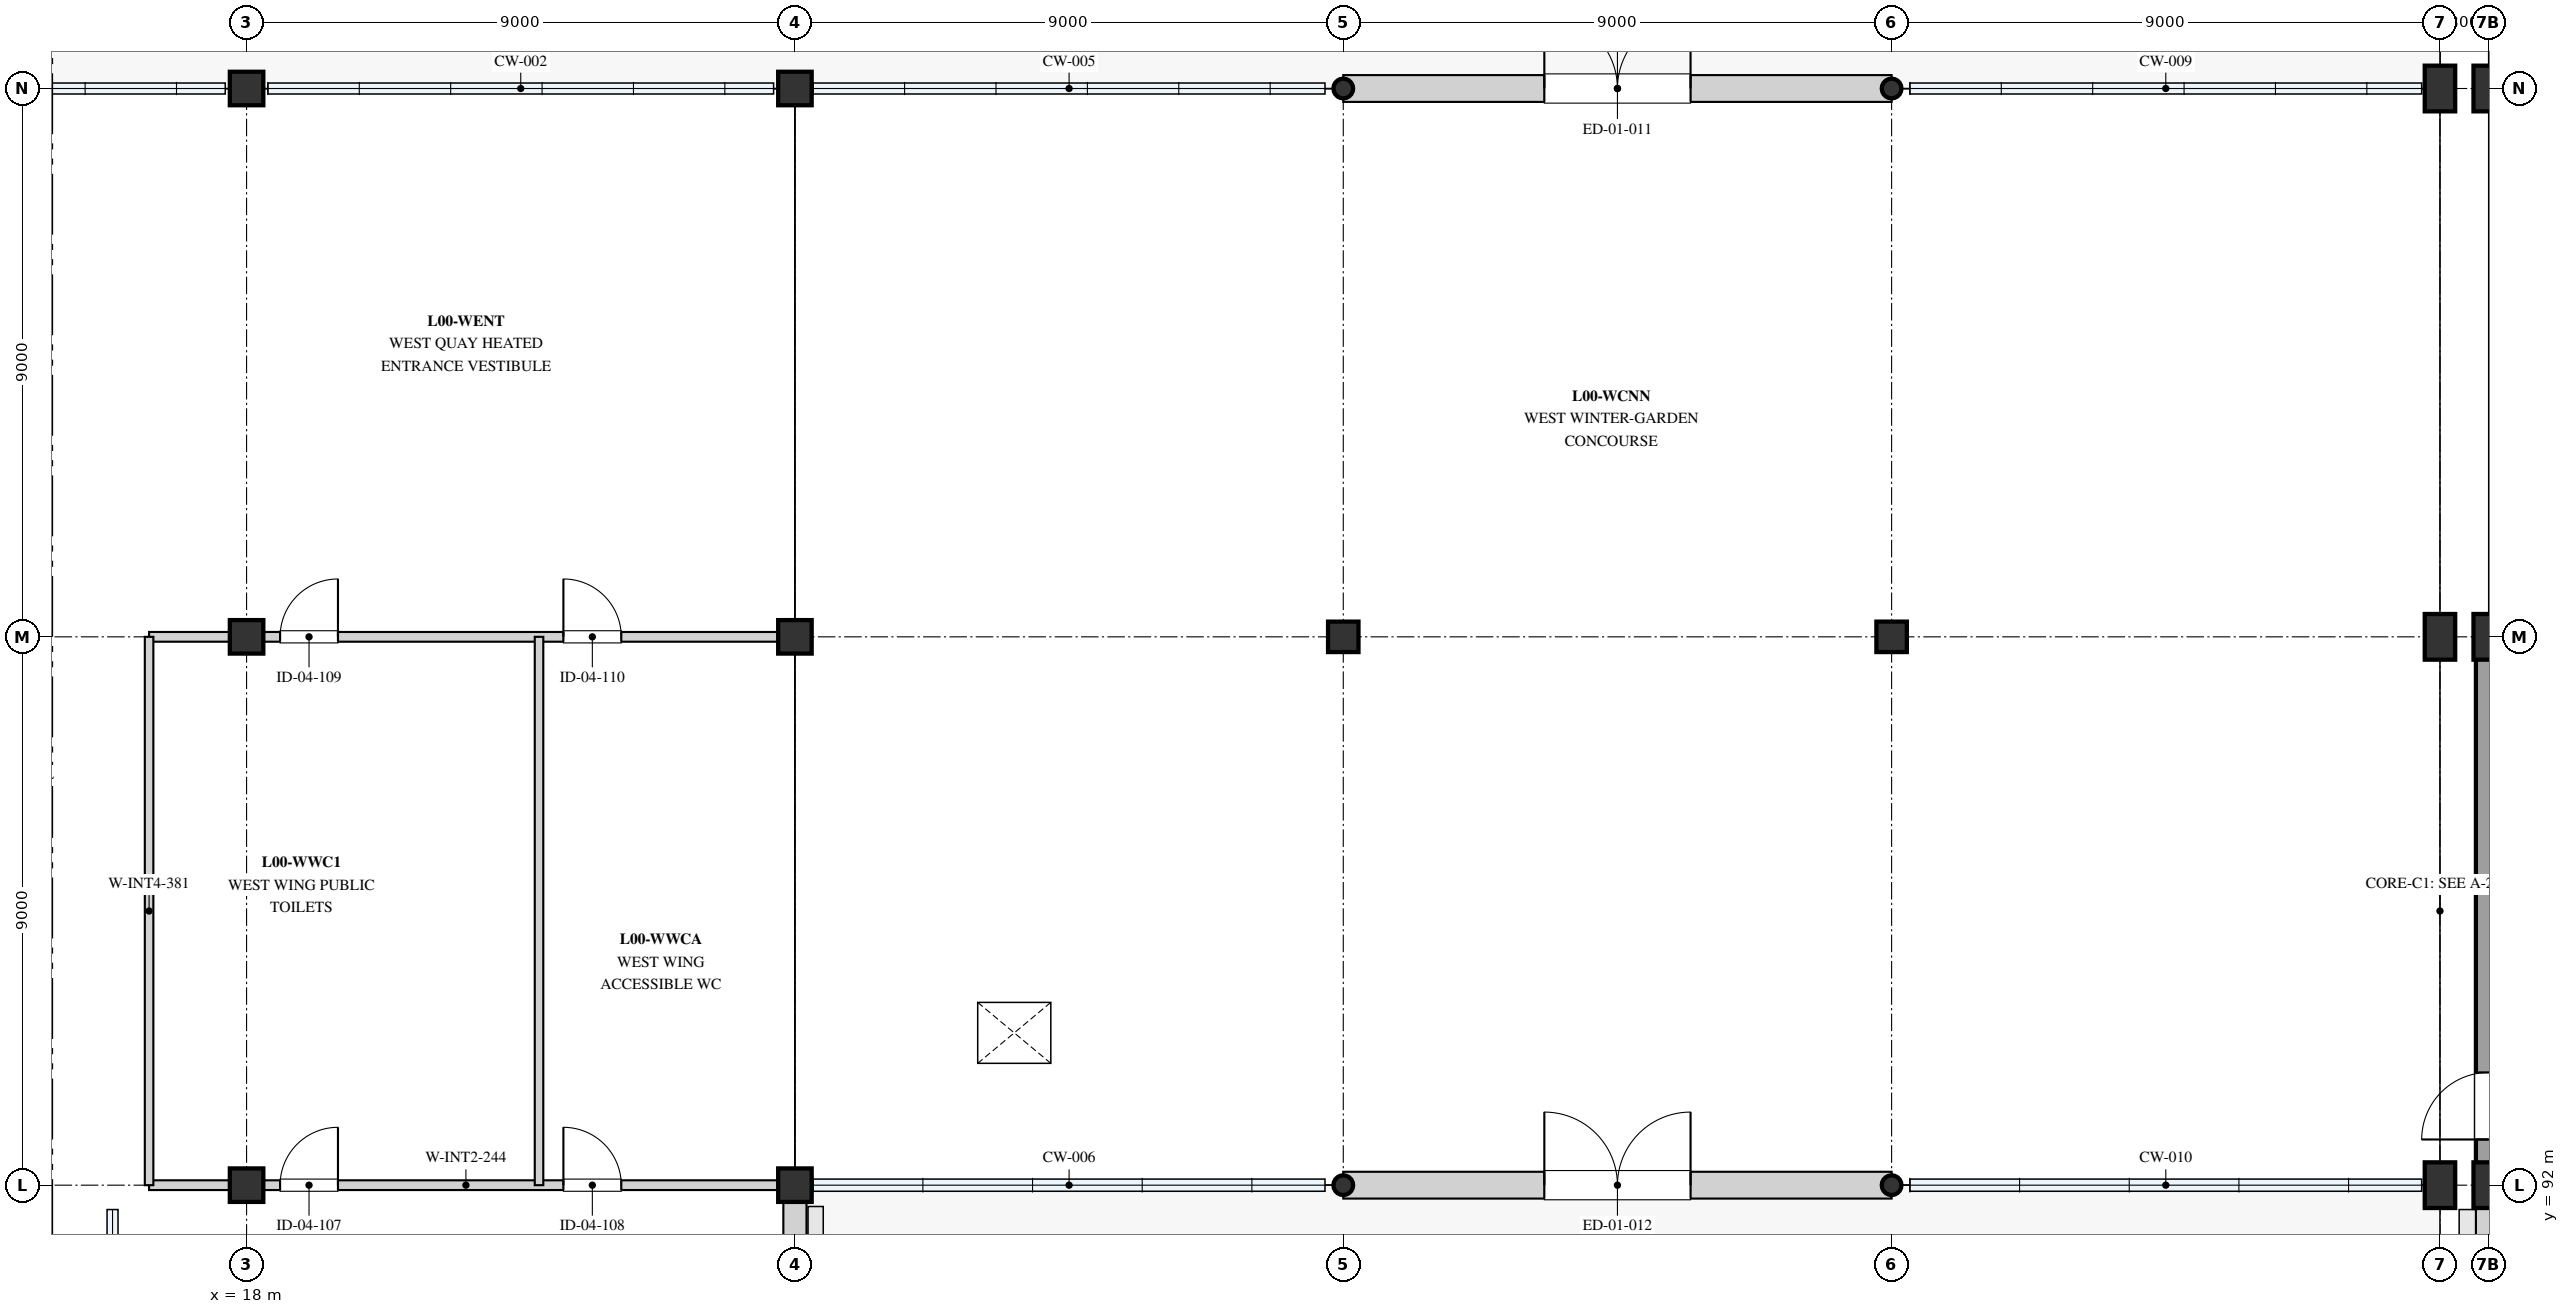
"""IFC4 building model, lengths in metres.
Left out: names, types, materials, properties, quantities, classifications, styles, units other than length and angle.
Written with IfcOpenShell. Run it as: python <this file> out.ifc"""

import sys

from ifc_helpers import new_model, si_unit, direction, frame, frame_2d, origin, origin_2d, place, context, subcontext, project, spatial, rectangle, hollow_circle, extrude, element, fill, save


model = new_model("IFC4")
c1 = context("Model", 3, precision=1e-05, world=origin(), true_north=direction((0.0, 1.0)))
c2 = subcontext(c1, "Body", "Model", "MODEL_VIEW")
j1 = project(units=[si_unit("LENGTHUNIT", "METRE"), si_unit("PLANEANGLEUNIT", "RADIAN")], contexts=[c1])
p1 = place(None, origin())
s1 = spatial("IfcSite", under=j1, at=p1, CompositionType="ELEMENT")
p2 = place(p1, origin())
s2 = spatial("IfcBuilding", under=s1, at=p2, CompositionType="ELEMENT")
p3 = place(p2, origin())
s3 = spatial("IfcBuildingStorey", under=s2, at=p3, CompositionType="ELEMENT", Elevation=0.0)
for number, where, z_axis, x_axis in (
    (1, (18.0, 92.0, 0.0), (0.0, 0.0, 1.0), (1.0, 0.0, 0.0)),
    (2, (18.0, 101.0, 0.0), (0.0, 0.0, 1.0), (1.0, 0.0, 0.0)),
    (3, (18.0, 110.0, 0.0), (0.0, 0.0, 1.0), (1.0, 0.0, 0.0)),
    (4, (27.0, 92.0, 0.0), (0.0, 0.0, 1.0), (1.0, 0.0, 0.0)),
    (5, (27.0, 101.0, 0.0), (0.0, 0.0, 1.0), (1.0, 0.0, 0.0)),
    (6, (27.0, 110.0, 0.0), (0.0, 0.0, 1.0), (1.0, 0.0, 0.0)),
):
    element("IfcColumn", number, at=place(p3, frame(where, z_axis=z_axis, x_axis=x_axis)), inside=s3, PredefinedType="COLUMN", context=c2, shape_type="SweptSolid", body=[
        extrude(rectangle(XDim=0.55, YDim=0.55, at=origin_2d()), origin(), (0.0, 0.0, 1.0), 4.5),
    ])
p4 = place(p3, frame((36.0, 92.0, 0.0), z_axis=(0.0, 0.0, 1.0), x_axis=(1.0, 0.0, 0.0)))
e7 = element("IfcColumn", 7, at=p4, inside=s3, PredefinedType="PILASTER", context=c2, shape_type="SweptSolid", body=[
    extrude(hollow_circle(Radius=0.162, WallThickness=0.012, at=origin_2d()), origin(), (0.0, 0.0, 1.0), 4.5),
])
p5 = place(p3, frame((36.0, 101.0, 0.0), z_axis=(0.0, 0.0, 1.0), x_axis=(1.0, 0.0, 0.0)))
e8 = element("IfcColumn", 8, at=p5, inside=s3, PredefinedType="COLUMN", context=c2, shape_type="SweptSolid", body=[
    extrude(rectangle(XDim=0.5, YDim=0.5, at=origin_2d()), origin(), (0.0, 0.0, 1.0), 4.5),
])
for number, where, z_axis, x_axis in (
    (9, (36.0, 110.0, 0.0), (0.0, 0.0, 1.0), (1.0, 0.0, 0.0)),
    (10, (45.0, 92.0, 0.0), (0.0, 0.0, 1.0), (1.0, 0.0, 0.0)),
):
    element("IfcColumn", number, at=place(p3, frame(where, z_axis=z_axis, x_axis=x_axis)), inside=s3, PredefinedType="PILASTER", context=c2, shape_type="SweptSolid", body=[
        extrude(hollow_circle(Radius=0.162, WallThickness=0.012, at=origin_2d()), origin(), (0.0, 0.0, 1.0), 4.5),
    ])
p6 = place(p3, frame((45.0, 101.0, 0.0), z_axis=(0.0, 0.0, 1.0), x_axis=(1.0, 0.0, 0.0)))
e11 = element("IfcColumn", 11, at=p6, inside=s3, PredefinedType="COLUMN", context=c2, shape_type="SweptSolid", body=[
    extrude(rectangle(XDim=0.5, YDim=0.5, at=origin_2d()), origin(), (0.0, 0.0, 1.0), 4.5),
])
p7 = place(p3, frame((45.0, 110.0, 0.0), z_axis=(0.0, 0.0, 1.0), x_axis=(1.0, 0.0, 0.0)))
e12 = element("IfcColumn", 12, at=p7, inside=s3, PredefinedType="PILASTER", context=c2, shape_type="SweptSolid", body=[
    extrude(hollow_circle(Radius=0.162, WallThickness=0.012, at=origin_2d()), origin(), (0.0, 0.0, 1.0), 4.5),
])
for number, where, z_axis, x_axis in (
    (13, (54.0, 92.0, 0.0), (0.0, 0.0, 1.0), (1.0, 0.0, 0.0)),
    (14, (54.0, 101.0, 0.0), (0.0, 0.0, 1.0), (1.0, 0.0, 0.0)),
    (15, (54.0, 110.0, 0.0), (0.0, 0.0, 1.0), (1.0, 0.0, 0.0)),
    (16, (54.8, 92.0, 0.0), (0.0, 0.0, 1.0), (1.0, 0.0, 0.0)),
    (17, (54.8, 101.0, 0.0), (0.0, 0.0, 1.0), (1.0, 0.0, 0.0)),
    (18, (54.8, 110.0, 0.0), (0.0, 0.0, 1.0), (1.0, 0.0, 0.0)),
):
    element("IfcColumn", number, at=place(p3, frame(where, z_axis=z_axis, x_axis=x_axis)), inside=s3, PredefinedType="COLUMN", context=c2, shape_type="SweptSolid", body=[
        extrude(rectangle(XDim=0.5, YDim=0.75, at=origin_2d()), origin(), (0.0, 0.0, 1.0), 4.5),
    ])
p8 = place(p3, frame((27.0, 83.0, 0.0), z_axis=(0.0, 0.0, 1.0), x_axis=(0.0, 1.0, 0.0)))
e19 = element("IfcWall", 19, at=p8, inside=s3, PredefinedType="STANDARD", context=c2, shape_type="SweptSolid", body=[
    extrude(rectangle(XDim=9.0, YDim=0.38, at=frame_2d((4.5, 0.0))), origin(), (0.0, 0.0, 1.0), 3.35),
])
p9 = place(p8, frame((2.1, 0.0, 0.95)))
e20 = element("IfcOpeningElement", 20, at=p9, cuts=e19, PredefinedType="OPENING", context=c2, shape_type="SweptSolid", body=[
    extrude(rectangle(XDim=1.6, YDim=2.1, at=frame_2d((0.8, 1.05))), frame((0.0, 0.2, 0.0), z_axis=(0.0, -1.0, 0.0), x_axis=(1.0, 0.0, 0.0)), (0.0, 0.0, 1.0), 0.4),
])
p10 = place(p8, frame((5.3, 0.0, 0.95)))
e21 = element("IfcOpeningElement", 21, at=p10, cuts=e19, PredefinedType="OPENING", context=c2, shape_type="SweptSolid", body=[
    extrude(rectangle(XDim=1.6, YDim=2.1, at=frame_2d((0.8, 1.05))), frame((0.0, 0.2, 0.0), z_axis=(0.0, -1.0, 0.0), x_axis=(1.0, 0.0, 0.0)), (0.0, 0.0, 1.0), 0.4),
])
p11 = place(p3, frame((36.0, 110.0, 0.0), z_axis=(0.0, 0.0, 1.0), x_axis=(1.0, 0.0, 0.0)))
e22 = element("IfcWall", 22, at=p11, inside=s3, PredefinedType="STANDARD", context=c2, shape_type="SweptSolid", body=[
    extrude(rectangle(XDim=9.0, YDim=0.44, at=frame_2d((4.5, 0.0))), origin(), (0.0, 0.0, 1.0), 3.52),
])
p12 = place(p11, frame((3.3, 0.0, 0.0)))
e23 = element("IfcOpeningElement", 23, at=p12, cuts=e22, PredefinedType="OPENING", context=c2, shape_type="SweptSolid", body=[
    extrude(rectangle(XDim=2.4, YDim=2.6, at=frame_2d((1.2, 1.3))), frame((0.0, 0.23, 0.0), z_axis=(0.0, -1.0, 0.0), x_axis=(1.0, 0.0, 0.0)), (0.0, 0.0, 1.0), 0.46),
])
p13 = place(p3, frame((36.0, 92.0, 0.0), z_axis=(0.0, 0.0, 1.0), x_axis=(1.0, 0.0, 0.0)))
e24 = element("IfcWall", 24, at=p13, inside=s3, PredefinedType="STANDARD", context=c2, shape_type="SweptSolid", body=[
    extrude(rectangle(XDim=9.0, YDim=0.44, at=frame_2d((4.5, 0.0))), origin(), (0.0, 0.0, 1.0), 3.6),
])
p14 = place(p13, frame((3.3, 0.0, 0.0)))
e25 = element("IfcOpeningElement", 25, at=p14, cuts=e24, PredefinedType="OPENING", context=c2, shape_type="SweptSolid", body=[
    extrude(rectangle(XDim=2.4, YDim=2.6, at=frame_2d((1.2, 1.3))), frame((0.0, 0.23, 0.0), z_axis=(0.0, -1.0, 0.0), x_axis=(1.0, 0.0, 0.0)), (0.0, 0.0, 1.0), 0.46),
])
p15 = place(p3, frame((54.8, 92.0, 0.0), z_axis=(0.0, 0.0, 1.0), x_axis=(0.0, 1.0, 0.0)))
e26 = element("IfcWall", 26, at=p15, inside=s3, PredefinedType="STANDARD", context=c2, shape_type="SweptSolid", body=[
    extrude(rectangle(XDim=9.0, YDim=0.42, at=frame_2d((4.5, 0.0))), origin(), (0.0, 0.0, 1.0), 4.24),
])
p16 = place(p15, frame((0.75, 0.0, 0.0)))
e27 = element("IfcOpeningElement", 27, at=p16, cuts=e26, PredefinedType="OPENING", context=c2, shape_type="SweptSolid", body=[
    extrude(rectangle(XDim=1.1, YDim=2.2, at=frame_2d((0.55, 1.1))), frame((0.0, 0.22, 0.0), z_axis=(0.0, -1.0, 0.0), x_axis=(1.0, 0.0, 0.0)), (0.0, 0.0, 1.0), 0.44),
])
p17 = place(p3, frame((54.8, 83.0, 0.0), z_axis=(0.0, 0.0, 1.0), x_axis=(0.0, 1.0, 0.0)))
e28 = element("IfcWall", 28, at=p17, inside=s3, PredefinedType="STANDARD", context=c2, shape_type="SweptSolid", body=[
    extrude(rectangle(XDim=9.0, YDim=0.42, at=frame_2d((4.5, 0.0))), origin(), (0.0, 0.0, 1.0), 3.37),
])
p18 = place(p17, frame((1.8, 0.0, 0.59)))
e29 = element("IfcOpeningElement", 29, at=p18, cuts=e28, PredefinedType="OPENING", context=c2, shape_type="SweptSolid", body=[
    extrude(rectangle(XDim=2.4, YDim=2.6, at=frame_2d((1.2, 1.3))), frame((0.0, 0.22, 0.0), z_axis=(0.0, -1.0, 0.0), x_axis=(1.0, 0.0, 0.0)), (0.0, 0.0, 1.0), 0.44),
])
p19 = place(p17, frame((4.8, 0.0, 0.59)))
e30 = element("IfcOpeningElement", 30, at=p19, cuts=e28, PredefinedType="OPENING", context=c2, shape_type="SweptSolid", body=[
    extrude(rectangle(XDim=2.4, YDim=2.6, at=frame_2d((1.2, 1.3))), frame((0.0, 0.22, 0.0), z_axis=(0.0, -1.0, 0.0), x_axis=(1.0, 0.0, 0.0)), (0.0, 0.0, 1.0), 0.44),
])
p20 = place(p3, frame((16.4, 92.0, 0.0), z_axis=(0.0, 0.0, 1.0), x_axis=(1.0, 0.0, 0.0)))
e31 = element("IfcWall", 31, at=p20, inside=s3, PredefinedType="PARTITIONING", context=c2, shape_type="SweptSolid", body=[
    extrude(rectangle(XDim=10.4, YDim=0.16, at=frame_2d((5.2, 0.0))), origin(), (0.0, 0.0, 1.0), 3.2),
])
p21 = place(p20, frame((2.15, 0.0, 0.0)))
e32 = element("IfcOpeningElement", 32, at=p21, cuts=e31, PredefinedType="OPENING", context=c2, shape_type="SweptSolid", body=[
    extrude(rectangle(XDim=0.95, YDim=2.1, at=frame_2d((0.475, 1.05))), frame((0.0, 0.09, 0.0), z_axis=(0.0, -1.0, 0.0), x_axis=(1.0, 0.0, 0.0)), (0.0, 0.0, 1.0), 0.18),
])
p22 = place(p20, frame((6.8, 0.0, 0.0)))
e33 = element("IfcOpeningElement", 33, at=p22, cuts=e31, PredefinedType="OPENING", context=c2, shape_type="SweptSolid", body=[
    extrude(rectangle(XDim=0.95, YDim=2.1, at=frame_2d((0.475, 1.05))), frame((0.0, 0.09, 0.0), z_axis=(0.0, -1.0, 0.0), x_axis=(1.0, 0.0, 0.0)), (0.0, 0.0, 1.0), 0.18),
])
p23 = place(p3, frame((16.4, 101.0, 0.0), z_axis=(0.0, 0.0, 1.0), x_axis=(1.0, 0.0, 0.0)))
e34 = element("IfcWall", 34, at=p23, inside=s3, PredefinedType="PARTITIONING", context=c2, shape_type="SweptSolid", body=[
    extrude(rectangle(XDim=10.4, YDim=0.16, at=frame_2d((5.2, 0.0))), origin(), (0.0, 0.0, 1.0), 3.2),
])
p24 = place(p23, frame((2.15, 0.0, 0.0)))
e35 = element("IfcOpeningElement", 35, at=p24, cuts=e34, PredefinedType="OPENING", context=c2, shape_type="SweptSolid", body=[
    extrude(rectangle(XDim=0.95, YDim=2.1, at=frame_2d((0.475, 1.05))), frame((0.0, 0.09, 0.0), z_axis=(0.0, -1.0, 0.0), x_axis=(1.0, 0.0, 0.0)), (0.0, 0.0, 1.0), 0.18),
])
p25 = place(p23, frame((6.8, 0.0, 0.0)))
e36 = element("IfcOpeningElement", 36, at=p25, cuts=e34, PredefinedType="OPENING", context=c2, shape_type="SweptSolid", body=[
    extrude(rectangle(XDim=0.95, YDim=2.1, at=frame_2d((0.475, 1.05))), frame((0.0, 0.09, 0.0), z_axis=(0.0, -1.0, 0.0), x_axis=(1.0, 0.0, 0.0)), (0.0, 0.0, 1.0), 0.18),
])
for number, where, z_axis, x_axis in (
    (37, (16.4, 92.0, 0.0), (0.0, 0.0, 1.0), (0.0, 1.0, 0.0)),
    (38, (22.8, 92.0, 0.0), (0.0, 0.0, 1.0), (0.0, 1.0, 0.0)),
):
    element("IfcWall", number, at=place(p3, frame(where, z_axis=z_axis, x_axis=x_axis)), inside=s3, PredefinedType="PARTITIONING", context=c2, shape_type="SweptSolid", body=[
        extrude(rectangle(XDim=9.0, YDim=0.14, at=frame_2d((4.5, 0.0))), origin(), (0.0, 0.0, 1.0), 3.2),
    ])
p26 = place(p12, origin())
e39 = element("IfcDoor", 39, at=p26, inside=s3, OperationType="DOUBLE_DOOR_SINGLE_SWING", PredefinedType="DOOR", context=c2, shape_type="SweptSolid", body=[
    extrude(rectangle(XDim=2.4, YDim=2.6, at=frame_2d((1.2, 1.3))), frame((0.0, 0.025, 0.0), z_axis=(0.0, -1.0, 0.0), x_axis=(1.0, 0.0, 0.0)), (0.0, 0.0, 1.0), 0.05),
])
fill(e23, e39)
p27 = place(p14, origin())
e40 = element("IfcDoor", 40, at=p27, inside=s3, OperationType="DOUBLE_DOOR_SINGLE_SWING", PredefinedType="DOOR", context=c2, shape_type="SweptSolid", body=[
    extrude(rectangle(XDim=2.4, YDim=2.6, at=frame_2d((1.2, 1.3))), frame((0.0, 0.025, 0.0), z_axis=(0.0, -1.0, 0.0), x_axis=(1.0, 0.0, 0.0)), (0.0, 0.0, 1.0), 0.05),
])
fill(e25, e40)
p28 = place(p16, origin())
e41 = element("IfcDoor", 41, at=p28, inside=s3, OperationType="SINGLE_SWING_LEFT", PredefinedType="DOOR", context=c2, shape_type="SweptSolid", body=[
    extrude(rectangle(XDim=1.1, YDim=2.2, at=frame_2d((0.55, 1.1))), frame((0.0, 0.025, 0.0), z_axis=(0.0, -1.0, 0.0), x_axis=(1.0, 0.0, 0.0)), (0.0, 0.0, 1.0), 0.05),
])
fill(e27, e41)
p29 = place(p21, origin())
e42 = element("IfcDoor", 42, at=p29, inside=s3, OperationType="SINGLE_SWING_RIGHT", PredefinedType="DOOR", context=c2, shape_type="SweptSolid", body=[
    extrude(rectangle(XDim=0.95, YDim=2.1, at=frame_2d((0.475, 1.05))), frame((0.0, 0.025, 0.0), z_axis=(0.0, -1.0, 0.0), x_axis=(1.0, 0.0, 0.0)), (0.0, 0.0, 1.0), 0.05),
])
fill(e32, e42)
p30 = place(p22, origin())
e43 = element("IfcDoor", 43, at=p30, inside=s3, OperationType="SINGLE_SWING_LEFT", PredefinedType="DOOR", context=c2, shape_type="SweptSolid", body=[
    extrude(rectangle(XDim=0.95, YDim=2.1, at=frame_2d((0.475, 1.05))), frame((0.0, 0.025, 0.0), z_axis=(0.0, -1.0, 0.0), x_axis=(1.0, 0.0, 0.0)), (0.0, 0.0, 1.0), 0.05),
])
fill(e33, e43)
p31 = place(p24, origin())
e44 = element("IfcDoor", 44, at=p31, inside=s3, OperationType="SINGLE_SWING_RIGHT", PredefinedType="DOOR", context=c2, shape_type="SweptSolid", body=[
    extrude(rectangle(XDim=0.95, YDim=2.1, at=frame_2d((0.475, 1.05))), frame((0.0, 0.025, 0.0), z_axis=(0.0, -1.0, 0.0), x_axis=(1.0, 0.0, 0.0)), (0.0, 0.0, 1.0), 0.05),
])
fill(e35, e44)
p32 = place(p25, origin())
e45 = element("IfcDoor", 45, at=p32, inside=s3, OperationType="SINGLE_SWING_LEFT", PredefinedType="DOOR", context=c2, shape_type="SweptSolid", body=[
    extrude(rectangle(XDim=0.95, YDim=2.1, at=frame_2d((0.475, 1.05))), frame((0.0, 0.025, 0.0), z_axis=(0.0, -1.0, 0.0), x_axis=(1.0, 0.0, 0.0)), (0.0, 0.0, 1.0), 0.05),
])
fill(e36, e45)
save(model, sys.argv[1])
